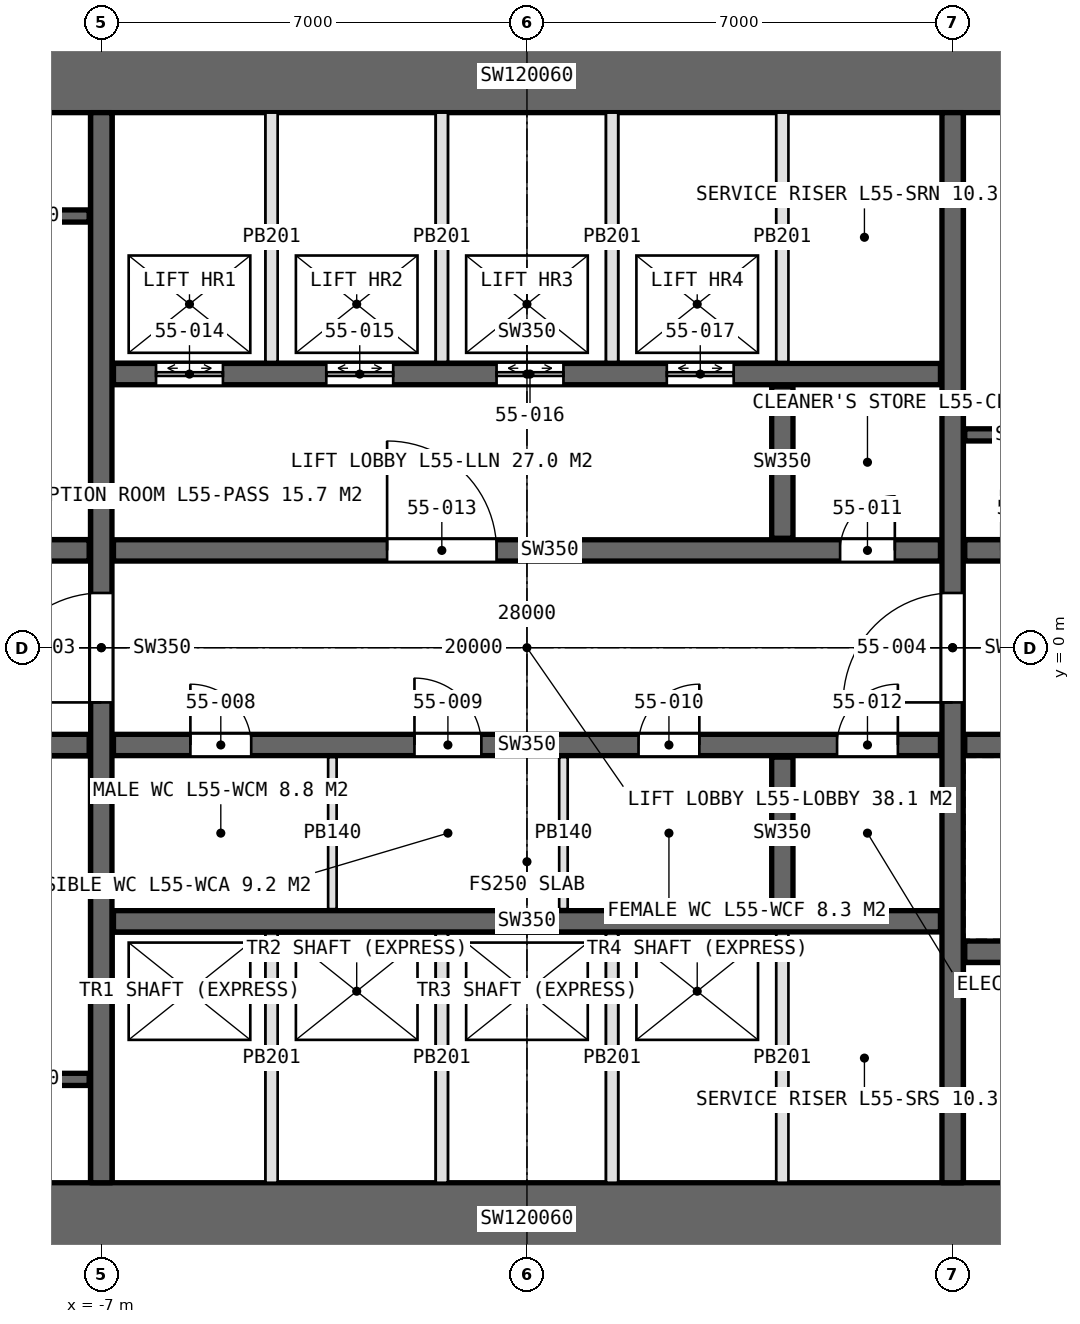
"""IFC4 building model, lengths in metres.
Left out: names, types, materials, properties, quantities, classifications, styles, units other than length and angle.
Written with IfcOpenShell. Run it as: python <this file> out.ifc"""

import sys

from ifc_helpers import new_model, si_unit, direction, frame, frame_2d, origin, place, context, subcontext, project, spatial, rectangle, extrude, element, fill, save


model = new_model("IFC4")
c1 = context("Model", 3, precision=1e-05, world=origin(), true_north=direction((0.0, 1.0)))
c2 = subcontext(c1, "Body", "Model", "MODEL_VIEW")
j1 = project(units=[si_unit("LENGTHUNIT", "METRE"), si_unit("PLANEANGLEUNIT", "RADIAN")], contexts=[c1])
p1 = place(None, origin())
s1 = spatial("IfcSite", under=j1, at=p1, CompositionType="ELEMENT")
p2 = place(p1, origin())
s2 = spatial("IfcBuilding", under=s1, at=p2, CompositionType="ELEMENT")
p3 = place(p2, frame((0.0, 0.0, 249.4)))
s3 = spatial("IfcBuildingStorey", under=s2, at=p3, CompositionType="ELEMENT", Elevation=249.4)
p4 = place(p3, frame((-14.0, -9.4, 0.0), z_axis=(0.0, 0.0, 1.0), x_axis=(1.0, 0.0, 0.0)))
e1 = element("IfcWall", 1, at=p4, inside=s3, PredefinedType="SHEAR", context=c2, shape_type="SweptSolid", body=[
    extrude(rectangle(XDim=28.0, YDim=1.2, at=frame_2d((14.0, 0.0))), origin(), (0.0, 0.0, 1.0), 4.2),
])
p5 = place(p4, frame((22.9, 0.0, 0.0)))
e2 = element("IfcOpeningElement", 2, at=p5, cuts=e1, PredefinedType="OPENING", context=c2, shape_type="SweptSolid", body=[
    extrude(rectangle(XDim=2.2, YDim=2.7, at=frame_2d((1.1, 1.35))), frame((0.0, 0.61, 0.0), z_axis=(0.0, -1.0, 0.0), x_axis=(1.0, 0.0, 0.0)), (0.0, 0.0, 1.0), 1.22),
])
p6 = place(p3, frame((14.0, 9.4, 0.0), z_axis=(0.0, 0.0, 1.0), x_axis=(-1.0, 0.0, 0.0)))
e3 = element("IfcWall", 3, at=p6, inside=s3, PredefinedType="SHEAR", context=c2, shape_type="SweptSolid", body=[
    extrude(rectangle(XDim=28.0, YDim=1.2, at=frame_2d((14.0, 0.0))), origin(), (0.0, 0.0, 1.0), 4.2),
])
p7 = place(p6, frame((24.0, 0.0, 0.0)))
e4 = element("IfcOpeningElement", 4, at=p7, cuts=e3, PredefinedType="OPENING", context=c2, shape_type="SweptSolid", body=[
    extrude(rectangle(XDim=1.0, YDim=2.4, at=frame_2d((0.5, 1.2))), frame((0.0, 0.61, 0.0), z_axis=(0.0, -1.0, 0.0), x_axis=(1.0, 0.0, 0.0)), (0.0, 0.0, 1.0), 1.22),
])
p8 = place(p3, frame((-7.0, -8.8, 0.0), z_axis=(0.0, 0.0, 1.0), x_axis=(0.0, 1.0, 0.0)))
e5 = element("IfcWall", 5, at=p8, inside=s3, PredefinedType="SHEAR", context=c2, shape_type="SweptSolid", body=[
    extrude(rectangle(XDim=17.6, YDim=0.35, at=frame_2d((8.8, 0.0))), origin(), (0.0, 0.0, 1.0), 4.2),
])
p9 = place(p8, frame((7.9, 0.0, 0.0)))
e6 = element("IfcOpeningElement", 6, at=p9, cuts=e5, PredefinedType="OPENING", context=c2, shape_type="SweptSolid", body=[
    extrude(rectangle(XDim=1.8, YDim=2.4, at=frame_2d((0.9, 1.2))), frame((0.0, 0.185, 0.0), z_axis=(0.0, -1.0, 0.0), x_axis=(1.0, 0.0, 0.0)), (0.0, 0.0, 1.0), 0.37),
])
p10 = place(p3, frame((7.0, -8.8, 0.0), z_axis=(0.0, 0.0, 1.0), x_axis=(0.0, 1.0, 0.0)))
e7 = element("IfcWall", 7, at=p10, inside=s3, PredefinedType="SHEAR", context=c2, shape_type="SweptSolid", body=[
    extrude(rectangle(XDim=17.6, YDim=0.35, at=frame_2d((8.8, 0.0))), origin(), (0.0, 0.0, 1.0), 4.2),
])
p11 = place(p10, frame((7.9, 0.0, 0.0)))
e8 = element("IfcOpeningElement", 8, at=p11, cuts=e7, PredefinedType="OPENING", context=c2, shape_type="SweptSolid", body=[
    extrude(rectangle(XDim=1.8, YDim=2.4, at=frame_2d((0.9, 1.2))), frame((0.0, 0.185, 0.0), z_axis=(0.0, -1.0, 0.0), x_axis=(1.0, 0.0, 0.0)), (0.0, 0.0, 1.0), 0.37),
])
p12 = place(p3, frame((-6.8, 1.6, 0.0), z_axis=(0.0, 0.0, 1.0), x_axis=(1.0, 0.0, 0.0)))
e9 = element("IfcWall", 9, at=p12, inside=s3, PredefinedType="SHEAR", context=c2, shape_type="SweptSolid", body=[
    extrude(rectangle(XDim=13.6, YDim=0.35, at=frame_2d((6.8, 0.0))), origin(), (0.0, 0.0, 1.0), 4.2),
])
p13 = place(p12, frame((11.95, 0.0, 0.0)))
e10 = element("IfcOpeningElement", 10, at=p13, cuts=e9, PredefinedType="OPENING", context=c2, shape_type="SweptSolid", body=[
    extrude(rectangle(XDim=0.9, YDim=2.4, at=frame_2d((0.45, 1.2))), frame((0.0, 0.185, 0.0), z_axis=(0.0, -1.0, 0.0), x_axis=(1.0, 0.0, 0.0)), (0.0, 0.0, 1.0), 0.37),
])
p14 = place(p12, frame((4.5, 0.0, 0.0)))
e11 = element("IfcOpeningElement", 11, at=p14, cuts=e9, PredefinedType="OPENING", context=c2, shape_type="SweptSolid", body=[
    extrude(rectangle(XDim=1.8, YDim=2.4, at=frame_2d((0.9, 1.2))), frame((0.0, 0.185, 0.0), z_axis=(0.0, -1.0, 0.0), x_axis=(1.0, 0.0, 0.0)), (0.0, 0.0, 1.0), 0.37),
])
p15 = place(p3, frame((-6.8, -1.6, 0.0), z_axis=(0.0, 0.0, 1.0), x_axis=(1.0, 0.0, 0.0)))
e12 = element("IfcWall", 12, at=p15, inside=s3, PredefinedType="SHEAR", context=c2, shape_type="SweptSolid", body=[
    extrude(rectangle(XDim=13.6, YDim=0.35, at=frame_2d((6.8, 0.0))), origin(), (0.0, 0.0, 1.0), 4.2),
])
p16 = place(p15, frame((1.265, 0.0, 0.0)))
e13 = element("IfcOpeningElement", 13, at=p16, cuts=e12, PredefinedType="OPENING", context=c2, shape_type="SweptSolid", body=[
    extrude(rectangle(XDim=1.0, YDim=2.4, at=frame_2d((0.5, 1.2))), frame((0.0, 0.185, 0.0), z_axis=(0.0, -1.0, 0.0), x_axis=(1.0, 0.0, 0.0)), (0.0, 0.0, 1.0), 0.37),
])
p17 = place(p15, frame((4.95, 0.0, 0.0)))
e14 = element("IfcOpeningElement", 14, at=p17, cuts=e12, PredefinedType="OPENING", context=c2, shape_type="SweptSolid", body=[
    extrude(rectangle(XDim=1.1, YDim=2.4, at=frame_2d((0.55, 1.2))), frame((0.0, 0.185, 0.0), z_axis=(0.0, -1.0, 0.0), x_axis=(1.0, 0.0, 0.0)), (0.0, 0.0, 1.0), 0.37),
])
p18 = place(p15, frame((8.635, 0.0, 0.0)))
e15 = element("IfcOpeningElement", 15, at=p18, cuts=e12, PredefinedType="OPENING", context=c2, shape_type="SweptSolid", body=[
    extrude(rectangle(XDim=1.0, YDim=2.4, at=frame_2d((0.5, 1.2))), frame((0.0, 0.185, 0.0), z_axis=(0.0, -1.0, 0.0), x_axis=(1.0, 0.0, 0.0)), (0.0, 0.0, 1.0), 0.37),
])
p19 = place(p15, frame((11.9, 0.0, 0.0)))
e16 = element("IfcOpeningElement", 16, at=p19, cuts=e12, PredefinedType="OPENING", context=c2, shape_type="SweptSolid", body=[
    extrude(rectangle(XDim=1.0, YDim=2.4, at=frame_2d((0.5, 1.2))), frame((0.0, 0.185, 0.0), z_axis=(0.0, -1.0, 0.0), x_axis=(1.0, 0.0, 0.0)), (0.0, 0.0, 1.0), 0.37),
])
p20 = place(p3, frame((-6.8, 4.5, 0.0), z_axis=(0.0, 0.0, 1.0), x_axis=(1.0, 0.0, 0.0)))
e17 = element("IfcWall", 17, at=p20, inside=s3, PredefinedType="SHEAR", context=c2, shape_type="SweptSolid", body=[
    extrude(rectangle(XDim=13.6, YDim=0.35, at=frame_2d((6.8, 0.0))), origin(), (0.0, 0.0, 1.0), 4.2),
])
p21 = place(p20, frame((0.7, 0.0, 0.0)))
e18 = element("IfcOpeningElement", 18, at=p21, cuts=e17, PredefinedType="OPENING", context=c2, shape_type="SweptSolid", body=[
    extrude(rectangle(XDim=1.1, YDim=2.4, at=frame_2d((0.55, 1.2))), frame((0.0, 0.185, 0.0), z_axis=(0.0, -1.0, 0.0), x_axis=(1.0, 0.0, 0.0)), (0.0, 0.0, 1.0), 0.37),
])
p22 = place(p20, frame((3.5, 0.0, 0.0)))
e19 = element("IfcOpeningElement", 19, at=p22, cuts=e17, PredefinedType="OPENING", context=c2, shape_type="SweptSolid", body=[
    extrude(rectangle(XDim=1.1, YDim=2.4, at=frame_2d((0.55, 1.2))), frame((0.0, 0.185, 0.0), z_axis=(0.0, -1.0, 0.0), x_axis=(1.0, 0.0, 0.0)), (0.0, 0.0, 1.0), 0.37),
])
p23 = place(p20, frame((6.3, 0.0, 0.0)))
e20 = element("IfcOpeningElement", 20, at=p23, cuts=e17, PredefinedType="OPENING", context=c2, shape_type="SweptSolid", body=[
    extrude(rectangle(XDim=1.1, YDim=2.4, at=frame_2d((0.55, 1.2))), frame((0.0, 0.185, 0.0), z_axis=(0.0, -1.0, 0.0), x_axis=(1.0, 0.0, 0.0)), (0.0, 0.0, 1.0), 0.37),
])
p24 = place(p20, frame((9.1, 0.0, 0.0)))
e21 = element("IfcOpeningElement", 21, at=p24, cuts=e17, PredefinedType="OPENING", context=c2, shape_type="SweptSolid", body=[
    extrude(rectangle(XDim=1.1, YDim=2.4, at=frame_2d((0.55, 1.2))), frame((0.0, 0.185, 0.0), z_axis=(0.0, -1.0, 0.0), x_axis=(1.0, 0.0, 0.0)), (0.0, 0.0, 1.0), 0.37),
])
p25 = place(p3, frame((-6.8, -4.5, 0.0), z_axis=(0.0, 0.0, 1.0), x_axis=(1.0, 0.0, 0.0)))
e22 = element("IfcWall", 22, at=p25, inside=s3, PredefinedType="SHEAR", context=c2, shape_type="SweptSolid", body=[
    extrude(rectangle(XDim=13.6, YDim=0.35, at=frame_2d((6.8, 0.0))), origin(), (0.0, 0.0, 1.0), 4.2),
])
for number, where, z_axis, x_axis in (
    (23, (-12.8, 1.6, 0.0), (0.0, 0.0, 1.0), (1.0, 0.0, 0.0)),
    (24, (-12.8, -1.6, 0.0), (0.0, 0.0, 1.0), (1.0, 0.0, 0.0)),
):
    element("IfcWall", number, at=place(p3, frame(where, z_axis=z_axis, x_axis=x_axis)), inside=s3, PredefinedType="SHEAR", context=c2, shape_type="SweptSolid", body=[
        extrude(rectangle(XDim=5.6, YDim=0.35, at=frame_2d((2.8, 0.0))), origin(), (0.0, 0.0, 1.0), 4.2),
    ])
p26 = place(p3, frame((7.2, 1.6, 0.0), z_axis=(0.0, 0.0, 1.0), x_axis=(1.0, 0.0, 0.0)))
e25 = element("IfcWall", 25, at=p26, inside=s3, PredefinedType="SHEAR", context=c2, shape_type="SweptSolid", body=[
    extrude(rectangle(XDim=5.6, YDim=0.35, at=frame_2d((2.8, 0.0))), origin(), (0.0, 0.0, 1.0), 4.2),
])
p27 = place(p26, frame((0.6, 0.0, 0.0)))
e26 = element("IfcOpeningElement", 26, at=p27, cuts=e25, PredefinedType="OPENING", context=c2, shape_type="SweptSolid", body=[
    extrude(rectangle(XDim=1.0, YDim=2.4, at=frame_2d((0.5, 1.2))), frame((0.0, 0.185, 0.0), z_axis=(0.0, -1.0, 0.0), x_axis=(1.0, 0.0, 0.0)), (0.0, 0.0, 1.0), 0.37),
])
p28 = place(p3, frame((7.2, -1.6, 0.0), z_axis=(0.0, 0.0, 1.0), x_axis=(1.0, 0.0, 0.0)))
e27 = element("IfcWall", 27, at=p28, inside=s3, PredefinedType="SHEAR", context=c2, shape_type="SweptSolid", body=[
    extrude(rectangle(XDim=5.6, YDim=0.35, at=frame_2d((2.8, 0.0))), origin(), (0.0, 0.0, 1.0), 4.2),
])
p29 = place(p28, frame((0.9, 0.0, 0.0)))
e28 = element("IfcOpeningElement", 28, at=p29, cuts=e27, PredefinedType="OPENING", context=c2, shape_type="SweptSolid", body=[
    extrude(rectangle(XDim=1.3, YDim=2.4, at=frame_2d((0.65, 1.2))), frame((0.0, 0.185, 0.0), z_axis=(0.0, -1.0, 0.0), x_axis=(1.0, 0.0, 0.0)), (0.0, 0.0, 1.0), 0.37),
])
p30 = place(p28, frame((3.9, 0.0, 0.0)))
e29 = element("IfcOpeningElement", 29, at=p30, cuts=e27, PredefinedType="OPENING", context=c2, shape_type="SweptSolid", body=[
    extrude(rectangle(XDim=1.3, YDim=2.4, at=frame_2d((0.65, 1.2))), frame((0.0, 0.185, 0.0), z_axis=(0.0, -1.0, 0.0), x_axis=(1.0, 0.0, 0.0)), (0.0, 0.0, 1.0), 0.37),
])
p31 = place(p3, frame((7.2, -5.0, 0.0), z_axis=(0.0, 0.0, 1.0), x_axis=(1.0, 0.0, 0.0)))
e30 = element("IfcWall", 30, at=p31, inside=s3, PredefinedType="SHEAR", context=c2, shape_type="SweptSolid", body=[
    extrude(rectangle(XDim=5.6, YDim=0.35, at=frame_2d((2.8, 0.0))), origin(), (0.0, 0.0, 1.0), 4.2),
])
for number, where, z_axis, x_axis in (
    (31, (4.2, 1.8, 0.0), (0.0, 0.0, 1.0), (0.0, 1.0, 0.0)),
    (32, (4.2, -4.3, 0.0), (0.0, 0.0, 1.0), (0.0, 1.0, 0.0)),
):
    element("IfcWall", number, at=place(p3, frame(where, z_axis=z_axis, x_axis=x_axis)), inside=s3, PredefinedType="SHEAR", context=c2, shape_type="SweptSolid", body=[
        extrude(rectangle(XDim=2.5, YDim=0.35, at=frame_2d((1.25, 0.0))), origin(), (0.0, 0.0, 1.0), 4.2),
    ])
for number, where, z_axis, x_axis in (
    (33, (-3.2, -1.8, 0.0), (0.0, 0.0, 1.0), (0.0, -1.0, 0.0)),
    (34, (0.6, -1.8, 0.0), (0.0, 0.0, 1.0), (0.0, -1.0, 0.0)),
):
    element("IfcWall", number, at=place(p3, frame(where, z_axis=z_axis, x_axis=x_axis)), inside=s3, PredefinedType="PARTITIONING", context=c2, shape_type="SweptSolid", body=[
        extrude(rectangle(XDim=2.5, YDim=0.14, at=frame_2d((1.25, 0.0))), origin(), (0.0, 0.0, 1.0), 3.95),
    ])
for number, where, z_axis, x_axis in (
    (35, (-4.2, 4.7, 0.0), (0.0, 0.0, 1.0), (0.0, 1.0, 0.0)),
    (36, (-1.4, 4.7, 0.0), (0.0, 0.0, 1.0), (0.0, 1.0, 0.0)),
    (37, (1.4, 4.7, 0.0), (0.0, 0.0, 1.0), (0.0, 1.0, 0.0)),
    (38, (4.2, 4.7, 0.0), (0.0, 0.0, 1.0), (0.0, 1.0, 0.0)),
    (39, (-4.2, -4.7, 0.0), (0.0, 0.0, 1.0), (0.0, -1.0, 0.0)),
    (40, (-1.4, -4.7, 0.0), (0.0, 0.0, 1.0), (0.0, -1.0, 0.0)),
    (41, (1.4, -4.7, 0.0), (0.0, 0.0, 1.0), (0.0, -1.0, 0.0)),
    (42, (4.2, -4.7, 0.0), (0.0, 0.0, 1.0), (0.0, -1.0, 0.0)),
):
    element("IfcWall", number, at=place(p3, frame(where, z_axis=z_axis, x_axis=x_axis)), inside=s3, PredefinedType="PARTITIONING", context=c2, shape_type="SweptSolid", body=[
        extrude(rectangle(XDim=4.1, YDim=0.2, at=frame_2d((2.05, 0.0))), origin(), (0.0, 0.0, 1.0), 4.2),
    ])
for number, where, z_axis, x_axis in (
    (43, (-9.15, 7.1, 0.0), (0.0, 0.0, 1.0), (1.0, 0.0, 0.0)),
    (44, (-9.15, -7.1, 0.0), (0.0, 0.0, 1.0), (1.0, 0.0, 0.0)),
    (45, (9.15, 3.5, 0.0), (0.0, 0.0, 1.0), (-1.0, 0.0, 0.0)),
):
    element("IfcWall", number, at=place(p3, frame(where, z_axis=z_axis, x_axis=x_axis)), inside=s3, PredefinedType="SOLIDWALL", context=c2, shape_type="SweptSolid", body=[
        extrude(rectangle(XDim=1.95, YDim=0.2, at=frame_2d((0.975, 0.0))), origin(), (0.0, 0.0, 1.0), 4.2),
    ])
p32 = place(p9, origin())
e46 = element("IfcDoor", 46, at=p32, inside=s3, OperationType="DOUBLE_DOOR_SINGLE_SWING", PredefinedType="DOOR", context=c2, shape_type="SweptSolid", body=[
    extrude(rectangle(XDim=1.8, YDim=2.4, at=frame_2d((0.9, 1.2))), frame((0.0, 0.025, 0.0), z_axis=(0.0, -1.0, 0.0), x_axis=(1.0, 0.0, 0.0)), (0.0, 0.0, 1.0), 0.05),
])
fill(e6, e46)
p33 = place(p11, origin())
e47 = element("IfcDoor", 47, at=p33, inside=s3, OperationType="DOUBLE_DOOR_SINGLE_SWING", PredefinedType="DOOR", context=c2, shape_type="SweptSolid", body=[
    extrude(rectangle(XDim=1.8, YDim=2.4, at=frame_2d((0.9, 1.2))), frame((0.0, 0.025, 0.0), z_axis=(0.0, -1.0, 0.0), x_axis=(1.0, 0.0, 0.0)), (0.0, 0.0, 1.0), 0.05),
])
fill(e8, e47)
p34 = place(p16, origin())
e48 = element("IfcDoor", 48, at=p34, inside=s3, OperationType="SINGLE_SWING_LEFT", PredefinedType="DOOR", context=c2, shape_type="SweptSolid", body=[
    extrude(rectangle(XDim=1.0, YDim=2.4, at=frame_2d((0.5, 1.2))), frame((0.0, 0.025, 0.0), z_axis=(0.0, -1.0, 0.0), x_axis=(1.0, 0.0, 0.0)), (0.0, 0.0, 1.0), 0.05),
])
fill(e13, e48)
p35 = place(p17, origin())
e49 = element("IfcDoor", 49, at=p35, inside=s3, OperationType="SINGLE_SWING_LEFT", PredefinedType="DOOR", context=c2, shape_type="SweptSolid", body=[
    extrude(rectangle(XDim=1.1, YDim=2.4, at=frame_2d((0.55, 1.2))), frame((0.0, 0.025, 0.0), z_axis=(0.0, -1.0, 0.0), x_axis=(1.0, 0.0, 0.0)), (0.0, 0.0, 1.0), 0.05),
])
fill(e14, e49)
p36 = place(p18, origin())
e50 = element("IfcDoor", 50, at=p36, inside=s3, OperationType="SINGLE_SWING_RIGHT", PredefinedType="DOOR", context=c2, shape_type="SweptSolid", body=[
    extrude(rectangle(XDim=1.0, YDim=2.4, at=frame_2d((0.5, 1.2))), frame((0.0, 0.025, 0.0), z_axis=(0.0, -1.0, 0.0), x_axis=(1.0, 0.0, 0.0)), (0.0, 0.0, 1.0), 0.05),
])
fill(e15, e50)
p37 = place(p13, origin())
e51 = element("IfcDoor", 51, at=p37, inside=s3, OperationType="SINGLE_SWING_RIGHT", PredefinedType="DOOR", context=c2, shape_type="SweptSolid", body=[
    extrude(rectangle(XDim=0.9, YDim=2.4, at=frame_2d((0.45, 1.2))), frame((0.0, 0.025, 0.0), z_axis=(0.0, -1.0, 0.0), x_axis=(1.0, 0.0, 0.0)), (0.0, 0.0, 1.0), 0.05),
])
fill(e10, e51)
p38 = place(p19, origin())
e52 = element("IfcDoor", 52, at=p38, inside=s3, OperationType="SINGLE_SWING_RIGHT", PredefinedType="DOOR", context=c2, shape_type="SweptSolid", body=[
    extrude(rectangle(XDim=1.0, YDim=2.4, at=frame_2d((0.5, 1.2))), frame((0.0, 0.025, 0.0), z_axis=(0.0, -1.0, 0.0), x_axis=(1.0, 0.0, 0.0)), (0.0, 0.0, 1.0), 0.05),
])
fill(e16, e52)
p39 = place(p14, origin())
e53 = element("IfcDoor", 53, at=p39, inside=s3, OperationType="DOUBLE_DOOR_SINGLE_SWING", PredefinedType="DOOR", context=c2, shape_type="SweptSolid", body=[
    extrude(rectangle(XDim=1.8, YDim=2.4, at=frame_2d((0.9, 1.2))), frame((0.0, 0.025, 0.0), z_axis=(0.0, -1.0, 0.0), x_axis=(1.0, 0.0, 0.0)), (0.0, 0.0, 1.0), 0.05),
])
fill(e11, e53)
p40 = place(p21, origin())
e54 = element("IfcDoor", 54, at=p40, inside=s3, OperationType="DOUBLE_DOOR_SLIDING", PredefinedType="DOOR", context=c2, shape_type="SweptSolid", body=[
    extrude(rectangle(XDim=1.1, YDim=2.4, at=frame_2d((0.55, 1.2))), frame((0.0, 0.025, 0.0), z_axis=(0.0, -1.0, 0.0), x_axis=(1.0, 0.0, 0.0)), (0.0, 0.0, 1.0), 0.05),
])
fill(e18, e54)
p41 = place(p22, origin())
e55 = element("IfcDoor", 55, at=p41, inside=s3, OperationType="DOUBLE_DOOR_SLIDING", PredefinedType="DOOR", context=c2, shape_type="SweptSolid", body=[
    extrude(rectangle(XDim=1.1, YDim=2.4, at=frame_2d((0.55, 1.2))), frame((0.0, 0.025, 0.0), z_axis=(0.0, -1.0, 0.0), x_axis=(1.0, 0.0, 0.0)), (0.0, 0.0, 1.0), 0.05),
])
fill(e19, e55)
p42 = place(p23, origin())
e56 = element("IfcDoor", 56, at=p42, inside=s3, OperationType="DOUBLE_DOOR_SLIDING", PredefinedType="DOOR", context=c2, shape_type="SweptSolid", body=[
    extrude(rectangle(XDim=1.1, YDim=2.4, at=frame_2d((0.55, 1.2))), frame((0.0, 0.025, 0.0), z_axis=(0.0, -1.0, 0.0), x_axis=(1.0, 0.0, 0.0)), (0.0, 0.0, 1.0), 0.05),
])
fill(e20, e56)
p43 = place(p24, origin())
e57 = element("IfcDoor", 57, at=p43, inside=s3, OperationType="DOUBLE_DOOR_SLIDING", PredefinedType="DOOR", context=c2, shape_type="SweptSolid", body=[
    extrude(rectangle(XDim=1.1, YDim=2.4, at=frame_2d((0.55, 1.2))), frame((0.0, 0.025, 0.0), z_axis=(0.0, -1.0, 0.0), x_axis=(1.0, 0.0, 0.0)), (0.0, 0.0, 1.0), 0.05),
])
fill(e21, e57)
save(model, sys.argv[1])
